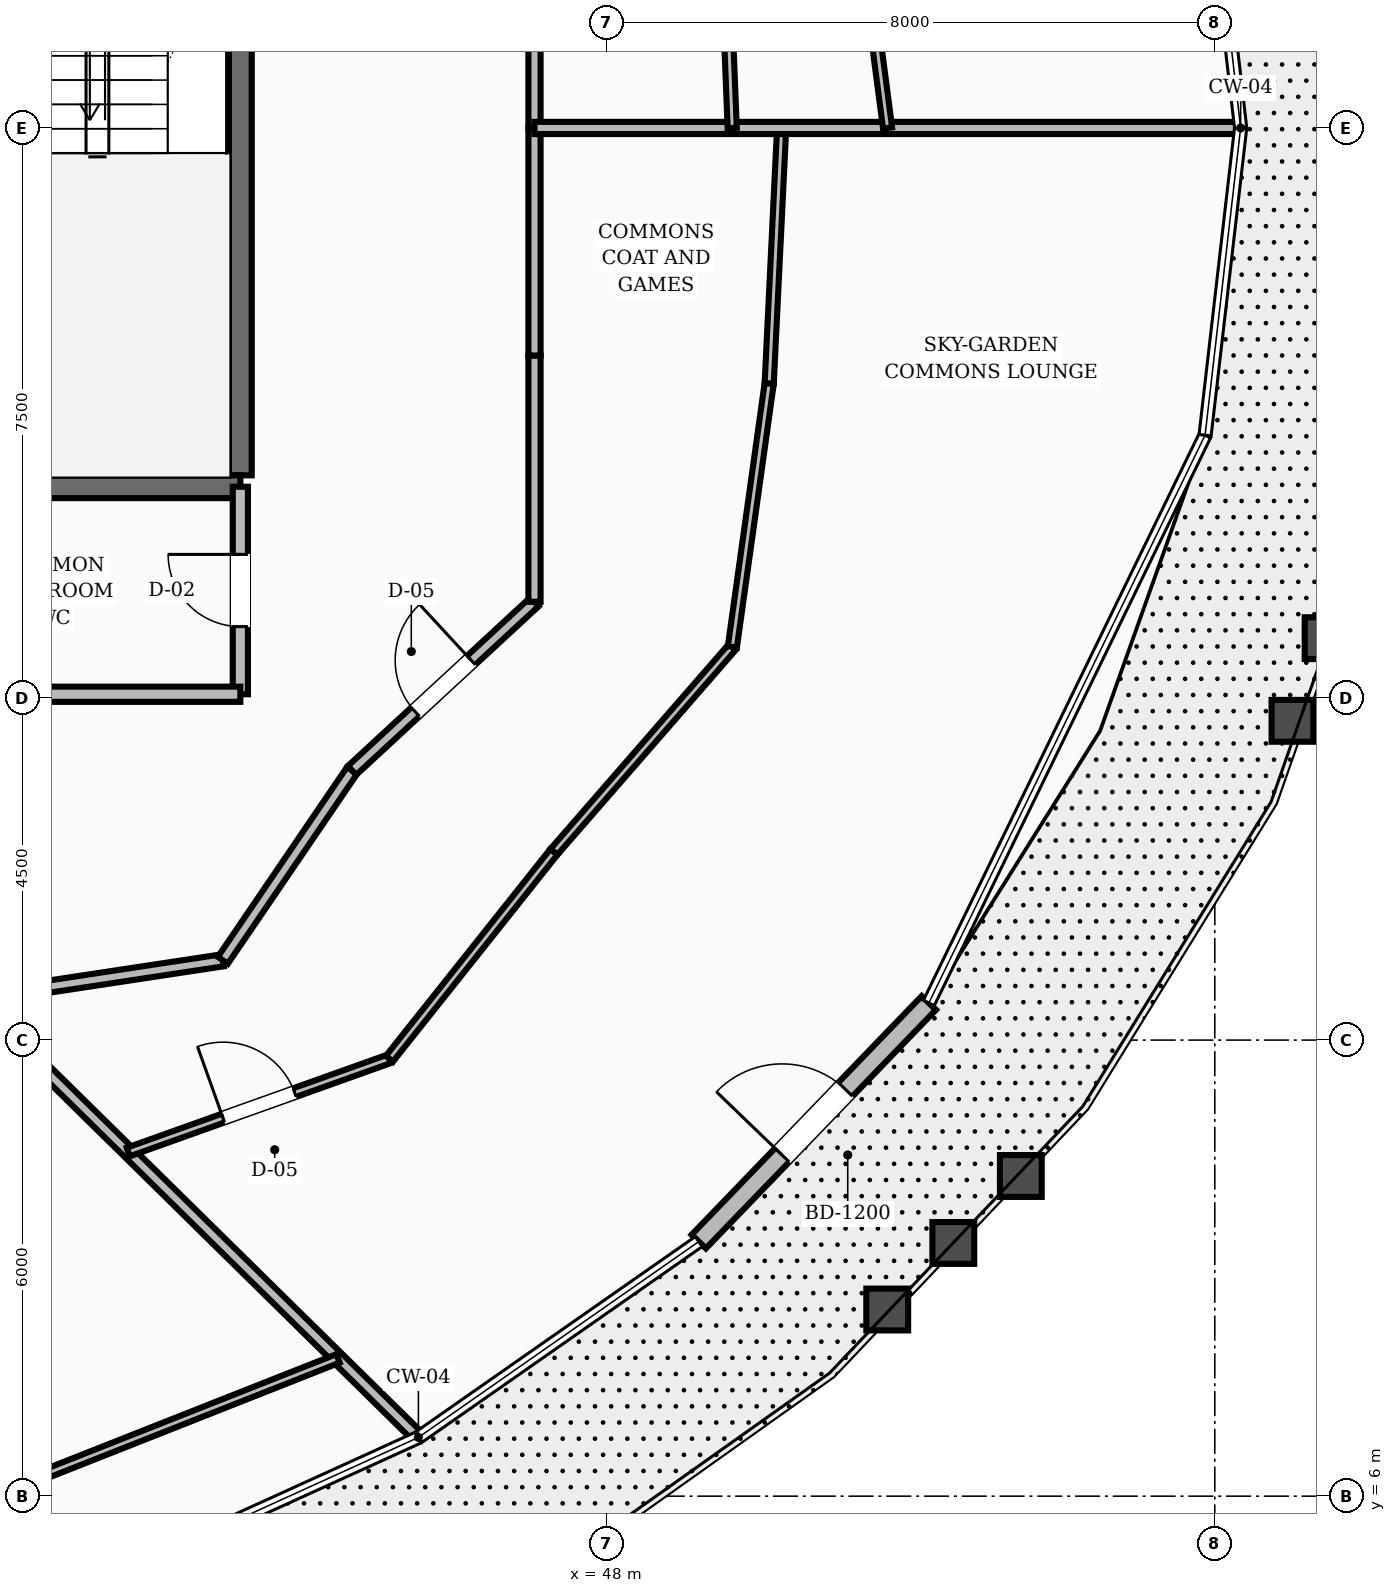
"""IFC4 building model, lengths in metres.
Left out: names, types, materials, properties, quantities, classifications, styles, units other than length and angle.
Written with IfcOpenShell. Run it as: python <this file> out.ifc"""

import sys

from ifc_helpers import new_model, si_unit, direction, frame, frame_2d, origin, place, context, subcontext, project, spatial, rectangle, extrude, element, fill, save


model = new_model("IFC4")
c1 = context("Model", 3, precision=1e-05, world=origin(), true_north=direction((0.0, 1.0)))
c2 = subcontext(c1, "Body", "Model", "MODEL_VIEW")
j1 = project(units=[si_unit("LENGTHUNIT", "METRE"), si_unit("PLANEANGLEUNIT", "RADIAN")], contexts=[c1])
p1 = place(None, origin())
s1 = spatial("IfcSite", under=j1, at=p1, CompositionType="ELEMENT")
p2 = place(p1, origin())
s2 = spatial("IfcBuilding", under=s1, at=p2, CompositionType="ELEMENT")
p3 = place(p2, frame((0.0, 0.0, 192.8)))
s3 = spatial("IfcBuildingStorey", under=s2, at=p3, CompositionType="ELEMENT", Elevation=192.8)
p4 = place(p3, frame((43.18, 19.43, 0.0), z_axis=(0.0, 0.0, 1.0), x_axis=(0.0, 1.0, 0.0)))
e1 = element("IfcWall", 1, at=p4, inside=s3, PredefinedType="SHEAR", context=c2, shape_type="SweptSolid", body=[
    extrude(rectangle(XDim=8.74, YDim=0.3, at=frame_2d((4.37, 0.0))), origin(), (0.0, 0.0, 1.0), 3.6),
])
p5 = place(p3, frame((39.58, 19.28, 0.0), z_axis=(0.0, 0.0, 1.0), x_axis=(1.0, 0.0, 0.0)))
e2 = element("IfcWall", 2, at=p5, inside=s3, PredefinedType="SHEAR", context=c2, shape_type="SweptSolid", body=[
    extrude(rectangle(XDim=3.6, YDim=0.3, at=frame_2d((1.8, 0.0))), origin(), (0.0, 0.0, 1.0), 3.6),
])
p6 = place(p3, frame((49.211, 9.349, 0.0), z_axis=(0.0, 0.0, 1.0), x_axis=(0.694057872199, 0.719919210772, 0.0)))
e3 = element("IfcWall", 3, at=p6, inside=s3, PredefinedType="STANDARD", context=c2, shape_type="SweptSolid", body=[
    extrude(rectangle(XDim=4.362, YDim=0.26, at=frame_2d((2.181, 0.0))), origin(), (0.0, 0.0, 1.0), 2.82),
])
p7 = place(p6, frame((1.581, 0.0, 0.0)))
e4 = element("IfcOpeningElement", 4, at=p7, cuts=e3, PredefinedType="OPENING", context=c2, shape_type="SweptSolid", body=[
    extrude(rectangle(XDim=1.2, YDim=2.15, at=frame_2d((0.6, 1.075))), frame((0.0, 0.14, 0.0), z_axis=(0.0, -1.0, 0.0), x_axis=(1.0, 0.0, 0.0)), (0.0, 0.0, 1.0), 0.28),
])
p8 = place(p3, frame((43.18, 16.55, 0.0), z_axis=(0.0, 0.0, 1.0), x_axis=(0.0, 1.0, 0.0)))
e5 = element("IfcWall", 5, at=p8, inside=s3, PredefinedType="SOLIDWALL", context=c2, shape_type="SweptSolid", body=[
    extrude(rectangle(XDim=2.73, YDim=0.2, at=frame_2d((1.365, 0.0))), origin(), (0.0, 0.0, 1.0), 2.8),
])
p9 = place(p8, frame((0.89, 0.0, 0.0)))
e6 = element("IfcOpeningElement", 6, at=p9, cuts=e5, PredefinedType="OPENING", context=c2, shape_type="SweptSolid", body=[
    extrude(rectangle(XDim=0.95, YDim=2.1, at=frame_2d((0.475, 1.05))), frame((0.0, 0.11, 0.0), z_axis=(0.0, -1.0, 0.0), x_axis=(1.0, 0.0, 0.0)), (0.0, 0.0, 1.0), 0.22),
])
p10 = place(p3, frame((39.2, 16.55, 0.0), z_axis=(0.0, 0.0, 1.0), x_axis=(1.0, 0.0, 0.0)))
e7 = element("IfcWall", 7, at=p10, inside=s3, PredefinedType="SOLIDWALL", context=c2, shape_type="SweptSolid", body=[
    extrude(rectangle(XDim=3.98, YDim=0.2, at=frame_2d((1.99, 0.0))), origin(), (0.0, 0.0, 1.0), 2.8),
])
p11 = place(p3, frame((47.05, 24.0, 0.0), z_axis=(0.0, 0.0, 1.0), x_axis=(0.0, 1.0, 0.0)))
e8 = element("IfcWall", 8, at=p11, inside=s3, PredefinedType="SOLIDWALL", context=c2, shape_type="SweptSolid", body=[
    extrude(rectangle(XDim=2.994, YDim=0.16, at=frame_2d((1.497, 0.0))), origin(), (0.0, 0.0, 1.0), 2.8),
])
p12 = place(p3, frame((39.651, 12.55, 0.0), z_axis=(0.0, 0.0, 1.0), x_axis=(0.988710906508, 0.149835721217, 0.0)))
e9 = element("IfcWall", 9, at=p12, inside=s3, PredefinedType="SOLIDWALL", context=c2, shape_type="SweptSolid", body=[
    extrude(rectangle(XDim=3.337, YDim=0.16, at=frame_2d((1.668, 0.0))), origin(), (0.0, 0.0, 1.0), 2.8),
])
p13 = place(p3, frame((42.95, 13.05, 0.0), z_axis=(0.0, 0.0, 1.0), x_axis=(0.562674669208, 0.826678423955, 0.0)))
e10 = element("IfcWall", 10, at=p13, inside=s3, PredefinedType="SOLIDWALL", context=c2, shape_type="SweptSolid", body=[
    extrude(rectangle(XDim=3.021, YDim=0.16, at=frame_2d((1.511, 0.0))), origin(), (0.0, 0.0, 1.0), 2.8),
])
p14 = place(p3, frame((44.65, 15.548, 0.0), z_axis=(0.0, 0.0, 1.0), x_axis=(0.734347936521, 0.678773237633, 0.0)))
e11 = element("IfcWall", 11, at=p14, inside=s3, PredefinedType="SOLIDWALL", context=c2, shape_type="SweptSolid", body=[
    extrude(rectangle(XDim=3.268, YDim=0.16, at=frame_2d((1.634, 0.0))), origin(), (0.0, 0.0, 1.0), 2.8),
])
p15 = place(p14, frame((1.134, 0.0, 0.0)))
e12 = element("IfcOpeningElement", 12, at=p15, cuts=e11, PredefinedType="OPENING", context=c2, shape_type="SweptSolid", body=[
    extrude(rectangle(XDim=1.0, YDim=2.1, at=frame_2d((0.5, 1.05))), frame((0.0, 0.09, 0.0), z_axis=(0.0, -1.0, 0.0), x_axis=(1.0, 0.0, 0.0)), (0.0, 0.0, 1.0), 0.18),
])
p16 = place(p3, frame((47.05, 17.766, 0.0), z_axis=(0.0, 0.0, 1.0), x_axis=(0.0, 1.0, 0.0)))
e13 = element("IfcWall", 13, at=p16, inside=s3, PredefinedType="SOLIDWALL", context=c2, shape_type="SweptSolid", body=[
    extrude(rectangle(XDim=3.24, YDim=0.16, at=frame_2d((1.62, 0.0))), origin(), (0.0, 0.0, 1.0), 2.8),
])
p17 = place(p3, frame((47.05, 21.006, 0.0), z_axis=(0.0, 0.0, 1.0), x_axis=(0.0, 1.0, 0.0)))
e14 = element("IfcWall", 14, at=p17, inside=s3, PredefinedType="SOLIDWALL", context=c2, shape_type="SweptSolid", body=[
    extrude(rectangle(XDim=2.994, YDim=0.16, at=frame_2d((1.497, 0.0))), origin(), (0.0, 0.0, 1.0), 2.8),
])
p18 = place(p3, frame((39.651, 12.55, 0.0), z_axis=(0.0, 0.0, 1.0), x_axis=(0.71282340305, -0.701343564927, 0.0)))
e15 = element("IfcWall", 15, at=p18, inside=s3, PredefinedType="SOLIDWALL", context=c2, shape_type="SweptSolid", body=[
    extrude(rectangle(XDim=8.188, YDim=0.16, at=frame_2d((4.094, 0.0))), origin(), (0.0, 0.0, 1.0), 2.8),
])
p19 = place(p3, frame((41.706, 10.528, 0.0), z_axis=(0.0, 0.0, 1.0), x_axis=(0.941757051858, 0.33629400125, 0.0)))
e16 = element("IfcWall", 16, at=p19, inside=s3, PredefinedType="PARTITIONING", context=c2, shape_type="SweptSolid", body=[
    extrude(rectangle(XDim=3.648, YDim=0.12, at=frame_2d((1.824, 0.0))), origin(), (0.0, 0.0, 1.0), 2.8),
])
p20 = place(p19, frame((1.324, 0.0, 0.0)))
e17 = element("IfcOpeningElement", 17, at=p20, cuts=e16, PredefinedType="OPENING", context=c2, shape_type="SweptSolid", body=[
    extrude(rectangle(XDim=1.0, YDim=2.1, at=frame_2d((0.5, 1.05))), frame((0.0, 0.07, 0.0), z_axis=(0.0, -1.0, 0.0), x_axis=(1.0, 0.0, 0.0)), (0.0, 0.0, 1.0), 0.14),
])
p21 = place(p3, frame((45.141, 11.755, 0.0), z_axis=(0.0, 0.0, 1.0), x_axis=(0.622346697339, 0.782741712387, 0.0)))
e18 = element("IfcWall", 18, at=p21, inside=s3, PredefinedType="PARTITIONING", context=c2, shape_type="SweptSolid", body=[
    extrude(rectangle(XDim=3.478, YDim=0.12, at=frame_2d((1.739, 0.0))), origin(), (0.0, 0.0, 1.0), 2.8),
])
p22 = place(p3, frame((47.306, 14.477, 0.0), z_axis=(0.0, 0.0, 1.0), x_axis=(0.656655448043, 0.75419070702, 0.0)))
e19 = element("IfcWall", 19, at=p22, inside=s3, PredefinedType="PARTITIONING", context=c2, shape_type="SweptSolid", body=[
    extrude(rectangle(XDim=3.574, YDim=0.12, at=frame_2d((1.787, 0.0))), origin(), (0.0, 0.0, 1.0), 2.8),
])
p23 = place(p3, frame((49.653, 17.173, 0.0), z_axis=(0.0, 0.0, 1.0), x_axis=(0.138452193773, 0.990369118076, 0.0)))
e20 = element("IfcWall", 20, at=p23, inside=s3, PredefinedType="PARTITIONING", context=c2, shape_type="SweptSolid", body=[
    extrude(rectangle(XDim=3.5, YDim=0.12, at=frame_2d((1.75, 0.0))), origin(), (0.0, 0.0, 1.0), 2.8),
])
p24 = place(p3, frame((50.138, 20.639, 0.0), z_axis=(0.0, 0.0, 1.0), x_axis=(0.048689007284, 0.998813986971, 0.0)))
e21 = element("IfcWall", 21, at=p24, inside=s3, PredefinedType="PARTITIONING", context=c2, shape_type="SweptSolid", body=[
    extrude(rectangle(XDim=3.365, YDim=0.12, at=frame_2d((1.682, 0.0))), origin(), (0.0, 0.0, 1.0), 2.8),
])
p25 = place(p3, frame((47.05, 24.0, 0.0), z_axis=(0.0, 0.0, 1.0), x_axis=(1.0, 0.0, 0.0)))
e22 = element("IfcWall", 22, at=p25, inside=s3, PredefinedType="SOLIDWALL", context=c2, shape_type="SweptSolid", body=[
    extrude(rectangle(XDim=9.24, YDim=0.16, at=frame_2d((4.62, 0.0))), origin(), (0.0, 0.0, 1.0), 2.8),
])
p26 = place(p3, frame((49.651, 24.0, 0.0), z_axis=(0.0, 0.0, 1.0), x_axis=(-0.039778354948, 0.999208528025, 0.0)))
e23 = element("IfcWall", 23, at=p26, inside=s3, PredefinedType="PARTITIONING", context=c2, shape_type="SweptSolid", body=[
    extrude(rectangle(XDim=3.29, YDim=0.12, at=frame_2d((1.645, 0.0))), origin(), (0.0, 0.0, 1.0), 2.8),
])
p27 = place(p3, frame((51.695, 24.0, 0.0), z_axis=(0.0, 0.0, 1.0), x_axis=(-0.129733767917, 0.99154886388, 0.0)))
e24 = element("IfcWall", 24, at=p27, inside=s3, PredefinedType="PARTITIONING", context=c2, shape_type="SweptSolid", body=[
    extrude(rectangle(XDim=7.142, YDim=0.12, at=frame_2d((3.571, 0.0))), origin(), (0.0, 0.0, 1.0), 2.8),
])
p28 = place(p27, frame((4.264, 0.0, 0.0)))
e25 = element("IfcOpeningElement", 25, at=p28, cuts=e24, PredefinedType="OPENING", context=c2, shape_type="SweptSolid", body=[
    extrude(rectangle(XDim=0.95, YDim=2.1, at=frame_2d((0.475, 1.05))), frame((0.0, 0.07, 0.0), z_axis=(0.0, -1.0, 0.0), x_axis=(1.0, 0.0, 0.0)), (0.0, 0.0, 1.0), 0.14),
])
p29 = place(p3, frame((40.492, 6.242, 0.0), z_axis=(0.0, 0.0, 1.0), x_axis=(0.930040659777, 0.367456624871, 0.0)))
e26 = element("IfcWall", 26, at=p29, inside=s3, PredefinedType="PARTITIONING", context=c2, shape_type="SweptSolid", body=[
    extrude(rectangle(XDim=4.273, YDim=0.12, at=frame_2d((2.136, 0.0))), origin(), (0.0, 0.0, 1.0), 2.8),
])
p30 = place(p7, origin())
e27 = element("IfcDoor", 27, at=p30, inside=s3, OperationType="SINGLE_SWING_LEFT", PredefinedType="DOOR", context=c2, shape_type="SweptSolid", body=[
    extrude(rectangle(XDim=1.2, YDim=2.15, at=frame_2d((0.6, 1.075))), frame((0.0, 0.025, 0.0), z_axis=(0.0, -1.0, 0.0), x_axis=(1.0, 0.0, 0.0)), (0.0, 0.0, 1.0), 0.05),
])
fill(e4, e27)
p31 = place(p9, origin())
e28 = element("IfcDoor", 28, at=p31, inside=s3, OperationType="SINGLE_SWING_RIGHT", PredefinedType="DOOR", context=c2, shape_type="SweptSolid", body=[
    extrude(rectangle(XDim=0.95, YDim=2.1, at=frame_2d((0.475, 1.05))), frame((0.0, 0.025, 0.0), z_axis=(0.0, -1.0, 0.0), x_axis=(1.0, 0.0, 0.0)), (0.0, 0.0, 1.0), 0.05),
])
fill(e6, e28)
p32 = place(p15, origin())
e29 = element("IfcDoor", 29, at=p32, inside=s3, OperationType="SINGLE_SWING_RIGHT", PredefinedType="DOOR", context=c2, shape_type="SweptSolid", body=[
    extrude(rectangle(XDim=1.0, YDim=2.1, at=frame_2d((0.5, 1.05))), frame((0.0, 0.025, 0.0), z_axis=(0.0, -1.0, 0.0), x_axis=(1.0, 0.0, 0.0)), (0.0, 0.0, 1.0), 0.05),
])
fill(e12, e29)
p33 = place(p20, origin())
e30 = element("IfcDoor", 30, at=p33, inside=s3, OperationType="SINGLE_SWING_LEFT", PredefinedType="DOOR", context=c2, shape_type="SweptSolid", body=[
    extrude(rectangle(XDim=1.0, YDim=2.1, at=frame_2d((0.5, 1.05))), frame((0.0, 0.025, 0.0), z_axis=(0.0, -1.0, 0.0), x_axis=(1.0, 0.0, 0.0)), (0.0, 0.0, 1.0), 0.05),
])
fill(e17, e30)
save(model, sys.argv[1])
